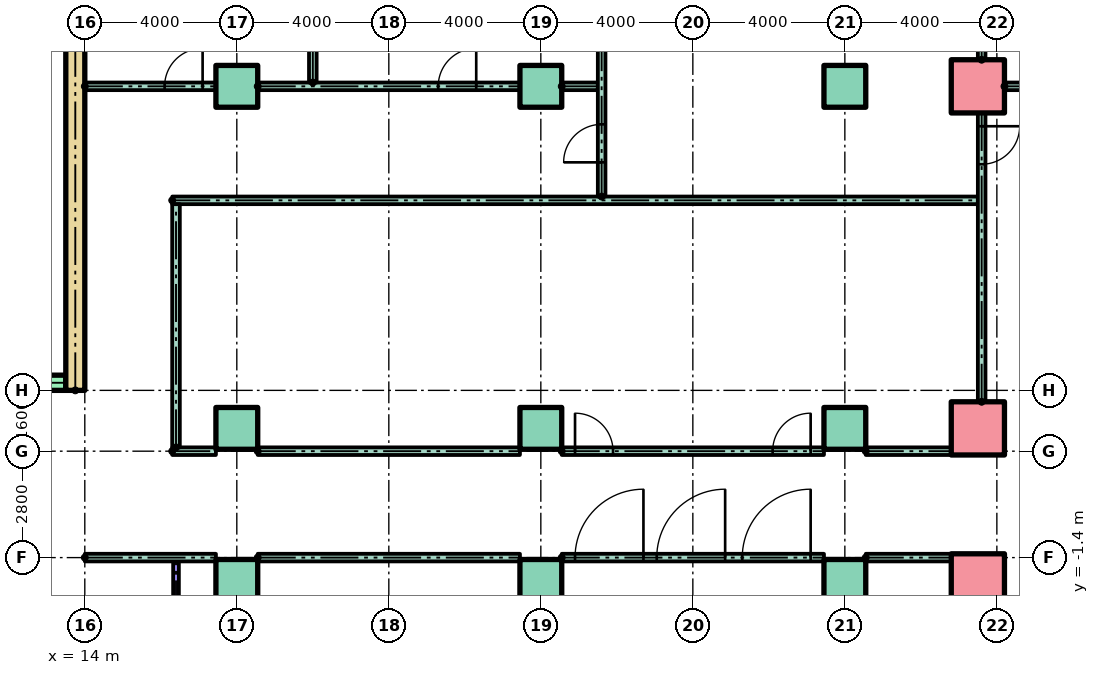
"""IFC4 building model, lengths in metres.
Left out: names, types, materials, properties, quantities, classifications, styles, units other than length and angle.
Written with IfcOpenShell. Run it as: python <this file> out.ifc"""

import sys

from ifc_helpers import new_model, si_unit, direction, frame, frame_2d, origin, origin_2d, place, context, subcontext, project, spatial, rectangle, hollow_rectangle, extrude, element, fill, save


model = new_model("IFC4")
c1 = context("Model", 3, precision=1e-05, world=origin(), true_north=direction((0.0, 1.0)))
c2 = subcontext(c1, "Body", "Model", "MODEL_VIEW")
j1 = project(units=[si_unit("LENGTHUNIT", "METRE"), si_unit("PLANEANGLEUNIT", "RADIAN")], contexts=[c1])
p1 = place(None, origin())
s1 = spatial("IfcSite", under=j1, at=p1, CompositionType="ELEMENT")
p2 = place(p1, origin())
s2 = spatial("IfcBuilding", under=s1, at=p2, CompositionType="ELEMENT")
p3 = place(p2, origin())
s3 = spatial("IfcBuildingStorey", under=s2, at=p3, CompositionType="ELEMENT", Elevation=0.0)
for number, where in (
    (1, (18.0, -2.0, 0.0)),
    (2, (26.0, -2.0, 0.0)),
    (3, (34.0, -2.0, 0.0)),
):
    element("IfcColumn", number, at=place(p3, frame(where)), inside=s3, PredefinedType="COLUMN", context=c2, shape_type="SweptSolid", body=[
        extrude(rectangle(XDim=1.1, YDim=1.1, at=origin_2d()), origin(), (0.0, 0.0, 1.0), 6.0),
    ])
p4 = place(p3, frame((37.5, -2.0, 0.0)))
e4 = element("IfcColumn", 4, at=p4, inside=s3, PredefinedType="COLUMN", context=c2, shape_type="SweptSolid", body=[
    extrude(hollow_rectangle(XDim=1.4, YDim=1.4, WallThickness=0.08, at=origin_2d()), origin(), (0.0, 0.0, 1.0), 6.0),
])
for number, where in (
    (5, (18.0, 2.0, 0.0)),
    (6, (26.0, 2.0, 0.0)),
    (7, (34.0, 2.0, 0.0)),
):
    element("IfcColumn", number, at=place(p3, frame(where)), inside=s3, PredefinedType="COLUMN", context=c2, shape_type="SweptSolid", body=[
        extrude(rectangle(XDim=1.1, YDim=1.1, at=origin_2d()), origin(), (0.0, 0.0, 1.0), 6.0),
    ])
p5 = place(p3, frame((37.5, 2.0, 0.0)))
e8 = element("IfcColumn", 8, at=p5, inside=s3, PredefinedType="COLUMN", context=c2, shape_type="SweptSolid", body=[
    extrude(hollow_rectangle(XDim=1.4, YDim=1.4, WallThickness=0.08, at=origin_2d()), origin(), (0.0, 0.0, 1.0), 6.0),
])
for number, where in (
    (9, (18.0, 11.0, 0.0)),
    (10, (26.0, 11.0, 0.0)),
    (11, (34.0, 11.0, 0.0)),
):
    element("IfcColumn", number, at=place(p3, frame(where)), inside=s3, PredefinedType="COLUMN", context=c2, shape_type="SweptSolid", body=[
        extrude(rectangle(XDim=1.1, YDim=1.1, at=origin_2d()), origin(), (0.0, 0.0, 1.0), 6.0),
    ])
p6 = place(p3, frame((37.5, 11.0, 0.0)))
e12 = element("IfcColumn", 12, at=p6, inside=s3, PredefinedType="COLUMN", context=c2, shape_type="SweptSolid", body=[
    extrude(hollow_rectangle(XDim=1.4, YDim=1.4, WallThickness=0.08, at=origin_2d()), origin(), (0.0, 0.0, 1.0), 6.0),
])
p7 = place(p3, frame((13.75, 3.0, 0.0), z_axis=(0.0, 0.0, 1.0), x_axis=(0.0, 1.0, 0.0)))
e13 = element("IfcWall", 13, at=p7, inside=s3, PredefinedType="SHEAR", context=c2, shape_type="SweptSolid", body=[
    extrude(rectangle(XDim=17.0, YDim=0.5, at=frame_2d((8.5, 0.0))), origin(), (0.0, 0.0, 1.0), 5.7),
])
p8 = place(p3, frame((-13.5, 3.2, 0.0)))
e14 = element("IfcWall", 14, at=p8, inside=s3, PredefinedType="SHEAR", context=c2, shape_type="SweptSolid", body=[
    extrude(rectangle(XDim=27.0, YDim=0.4, at=frame_2d((13.5, 0.0))), origin(), (0.0, 0.0, 1.0), 5.7),
])
p9 = place(p8, frame((0.772, 0.0, 0.0)))
e15 = element("IfcOpeningElement", 15, at=p9, cuts=e14, PredefinedType="OPENING", context=c2, shape_type="SweptSolid", body=[
    extrude(rectangle(XDim=1.1, YDim=2.1, at=frame_2d((0.55, 1.05))), frame((0.0, 0.21, 0.0), z_axis=(0.0, -1.0, 0.0), x_axis=(1.0, 0.0, 0.0)), (0.0, 0.0, 1.0), 0.42),
])
p10 = place(p8, frame((3.817, 0.0, 0.0)))
e16 = element("IfcOpeningElement", 16, at=p10, cuts=e14, PredefinedType="OPENING", context=c2, shape_type="SweptSolid", body=[
    extrude(rectangle(XDim=1.1, YDim=2.1, at=frame_2d((0.55, 1.05))), frame((0.0, 0.21, 0.0), z_axis=(0.0, -1.0, 0.0), x_axis=(1.0, 0.0, 0.0)), (0.0, 0.0, 1.0), 0.42),
])
p11 = place(p8, frame((6.861, 0.0, 0.0)))
e17 = element("IfcOpeningElement", 17, at=p11, cuts=e14, PredefinedType="OPENING", context=c2, shape_type="SweptSolid", body=[
    extrude(rectangle(XDim=1.1, YDim=2.1, at=frame_2d((0.55, 1.05))), frame((0.0, 0.21, 0.0), z_axis=(0.0, -1.0, 0.0), x_axis=(1.0, 0.0, 0.0)), (0.0, 0.0, 1.0), 0.42),
])
p12 = place(p8, frame((9.906, 0.0, 0.0)))
e18 = element("IfcOpeningElement", 18, at=p12, cuts=e14, PredefinedType="OPENING", context=c2, shape_type="SweptSolid", body=[
    extrude(rectangle(XDim=1.1, YDim=2.1, at=frame_2d((0.55, 1.05))), frame((0.0, 0.21, 0.0), z_axis=(0.0, -1.0, 0.0), x_axis=(1.0, 0.0, 0.0)), (0.0, 0.0, 1.0), 0.42),
])
p13 = place(p8, frame((15.994, 0.0, 0.0)))
e19 = element("IfcOpeningElement", 19, at=p13, cuts=e14, PredefinedType="OPENING", context=c2, shape_type="SweptSolid", body=[
    extrude(rectangle(XDim=1.1, YDim=2.1, at=frame_2d((0.55, 1.05))), frame((0.0, 0.21, 0.0), z_axis=(0.0, -1.0, 0.0), x_axis=(1.0, 0.0, 0.0)), (0.0, 0.0, 1.0), 0.42),
])
p14 = place(p8, frame((19.039, 0.0, 0.0)))
e20 = element("IfcOpeningElement", 20, at=p14, cuts=e14, PredefinedType="OPENING", context=c2, shape_type="SweptSolid", body=[
    extrude(rectangle(XDim=1.1, YDim=2.1, at=frame_2d((0.55, 1.05))), frame((0.0, 0.21, 0.0), z_axis=(0.0, -1.0, 0.0), x_axis=(1.0, 0.0, 0.0)), (0.0, 0.0, 1.0), 0.42),
])
p15 = place(p8, frame((12.6, 0.0, 0.0)))
e21 = element("IfcOpeningElement", 21, at=p15, cuts=e14, PredefinedType="OPENING", context=c2, shape_type="SweptSolid", body=[
    extrude(rectangle(XDim=1.8, YDim=2.1, at=frame_2d((0.9, 1.05))), frame((0.0, 0.21, 0.0), z_axis=(0.0, -1.0, 0.0), x_axis=(1.0, 0.0, 0.0)), (0.0, 0.0, 1.0), 0.42),
])
p16 = place(p3, frame((14.0, -1.4, 0.0)))
e22 = element("IfcWall", 22, at=p16, inside=s3, PredefinedType="PARTITIONING", context=c2, shape_type="SweptSolid", body=[
    extrude(rectangle(XDim=3.45, YDim=0.2, at=frame_2d((1.725, 0.0))), origin(), (0.0, 0.0, 1.0), 5.7),
])
p17 = place(p3, frame((18.55, -1.4, 0.0)))
e23 = element("IfcWall", 23, at=p17, inside=s3, PredefinedType="PARTITIONING", context=c2, shape_type="SweptSolid", body=[
    extrude(rectangle(XDim=6.9, YDim=0.2, at=frame_2d((3.45, 0.0))), origin(), (0.0, 0.0, 1.0), 5.7),
])
p18 = place(p3, frame((26.55, -1.4, 0.0)))
e24 = element("IfcWall", 24, at=p18, inside=s3, PredefinedType="PARTITIONING", context=c2, shape_type="SweptSolid", body=[
    extrude(rectangle(XDim=6.9, YDim=0.2, at=frame_2d((3.45, 0.0))), origin(), (0.0, 0.0, 1.0), 5.7),
])
p19 = place(p18, frame((0.35, 0.0, 0.0)))
e25 = element("IfcOpeningElement", 25, at=p19, cuts=e24, PredefinedType="OPENING", context=c2, shape_type="SweptSolid", body=[
    extrude(rectangle(XDim=1.8, YDim=2.1, at=frame_2d((0.9, 1.05))), frame((0.0, 0.11, 0.0), z_axis=(0.0, -1.0, 0.0), x_axis=(1.0, 0.0, 0.0)), (0.0, 0.0, 1.0), 0.22),
])
p20 = place(p18, frame((2.5, 0.0, 0.0)))
e26 = element("IfcOpeningElement", 26, at=p20, cuts=e24, PredefinedType="OPENING", context=c2, shape_type="SweptSolid", body=[
    extrude(rectangle(XDim=1.8, YDim=2.1, at=frame_2d((0.9, 1.05))), frame((0.0, 0.11, 0.0), z_axis=(0.0, -1.0, 0.0), x_axis=(1.0, 0.0, 0.0)), (0.0, 0.0, 1.0), 0.22),
])
p21 = place(p18, frame((4.75, 0.0, 0.0)))
e27 = element("IfcOpeningElement", 27, at=p21, cuts=e24, PredefinedType="OPENING", context=c2, shape_type="SweptSolid", body=[
    extrude(rectangle(XDim=1.8, YDim=2.1, at=frame_2d((0.9, 1.05))), frame((0.0, 0.11, 0.0), z_axis=(0.0, -1.0, 0.0), x_axis=(1.0, 0.0, 0.0)), (0.0, 0.0, 1.0), 0.22),
])
p22 = place(p3, frame((34.55, -1.4, 0.0)))
e28 = element("IfcWall", 28, at=p22, inside=s3, PredefinedType="PARTITIONING", context=c2, shape_type="SweptSolid", body=[
    extrude(rectangle(XDim=2.25, YDim=0.2, at=frame_2d((1.125, 0.0))), origin(), (0.0, 0.0, 1.0), 5.7),
])
p23 = place(p3, frame((16.3, 1.4, 0.0)))
e29 = element("IfcWall", 29, at=p23, inside=s3, PredefinedType="PARTITIONING", context=c2, shape_type="SweptSolid", body=[
    extrude(rectangle(XDim=1.15, YDim=0.2, at=frame_2d((0.575, 0.0))), origin(), (0.0, 0.0, 1.0), 5.7),
])
p24 = place(p3, frame((18.55, 1.4, 0.0)))
e30 = element("IfcWall", 30, at=p24, inside=s3, PredefinedType="PARTITIONING", context=c2, shape_type="SweptSolid", body=[
    extrude(rectangle(XDim=6.9, YDim=0.2, at=frame_2d((3.45, 0.0))), origin(), (0.0, 0.0, 1.0), 5.7),
])
p25 = place(p3, frame((26.55, 1.4, 0.0)))
e31 = element("IfcWall", 31, at=p25, inside=s3, PredefinedType="PARTITIONING", context=c2, shape_type="SweptSolid", body=[
    extrude(rectangle(XDim=6.9, YDim=0.2, at=frame_2d((3.45, 0.0))), origin(), (0.0, 0.0, 1.0), 5.7),
])
p26 = place(p25, frame((0.35, 0.0, 0.0)))
e32 = element("IfcOpeningElement", 32, at=p26, cuts=e31, PredefinedType="OPENING", context=c2, shape_type="SweptSolid", body=[
    extrude(rectangle(XDim=1.0, YDim=2.1, at=frame_2d((0.5, 1.05))), frame((0.0, 0.11, 0.0), z_axis=(0.0, -1.0, 0.0), x_axis=(1.0, 0.0, 0.0)), (0.0, 0.0, 1.0), 0.22),
])
p27 = place(p25, frame((5.55, 0.0, 0.0)))
e33 = element("IfcOpeningElement", 33, at=p27, cuts=e31, PredefinedType="OPENING", context=c2, shape_type="SweptSolid", body=[
    extrude(rectangle(XDim=1.0, YDim=2.1, at=frame_2d((0.5, 1.05))), frame((0.0, 0.11, 0.0), z_axis=(0.0, -1.0, 0.0), x_axis=(1.0, 0.0, 0.0)), (0.0, 0.0, 1.0), 0.22),
])
p28 = place(p3, frame((34.55, 1.4, 0.0)))
e34 = element("IfcWall", 34, at=p28, inside=s3, PredefinedType="PARTITIONING", context=c2, shape_type="SweptSolid", body=[
    extrude(rectangle(XDim=2.25, YDim=0.2, at=frame_2d((1.125, 0.0))), origin(), (0.0, 0.0, 1.0), 5.7),
])
p29 = place(p3, frame((16.3, 8.0, 0.0)))
e35 = element("IfcWall", 35, at=p29, inside=s3, PredefinedType="PARTITIONING", context=c2, shape_type="SweptSolid", body=[
    extrude(rectangle(XDim=21.2, YDim=0.2, at=frame_2d((10.6, 0.0))), origin(), (0.0, 0.0, 1.0), 5.7),
])
p30 = place(p3, frame((14.0, 11.0, 0.0)))
e36 = element("IfcWall", 36, at=p30, inside=s3, PredefinedType="PARTITIONING", context=c2, shape_type="SweptSolid", body=[
    extrude(rectangle(XDim=3.45, YDim=0.2, at=frame_2d((1.725, 0.0))), origin(), (0.0, 0.0, 1.0), 5.7),
])
p31 = place(p30, frame((2.1, 0.0, 0.0)))
e37 = element("IfcOpeningElement", 37, at=p31, cuts=e36, PredefinedType="OPENING", context=c2, shape_type="SweptSolid", body=[
    extrude(rectangle(XDim=1.0, YDim=2.1, at=frame_2d((0.5, 1.05))), frame((0.0, 0.11, 0.0), z_axis=(0.0, -1.0, 0.0), x_axis=(1.0, 0.0, 0.0)), (0.0, 0.0, 1.0), 0.22),
])
p32 = place(p3, frame((18.55, 11.0, 0.0)))
e38 = element("IfcWall", 38, at=p32, inside=s3, PredefinedType="PARTITIONING", context=c2, shape_type="SweptSolid", body=[
    extrude(rectangle(XDim=6.9, YDim=0.2, at=frame_2d((3.45, 0.0))), origin(), (0.0, 0.0, 1.0), 5.7),
])
p33 = place(p32, frame((4.75, 0.0, 0.0)))
e39 = element("IfcOpeningElement", 39, at=p33, cuts=e38, PredefinedType="OPENING", context=c2, shape_type="SweptSolid", body=[
    extrude(rectangle(XDim=1.0, YDim=2.1, at=frame_2d((0.5, 1.05))), frame((0.0, 0.11, 0.0), z_axis=(0.0, -1.0, 0.0), x_axis=(1.0, 0.0, 0.0)), (0.0, 0.0, 1.0), 0.22),
])
p34 = place(p3, frame((26.55, 11.0, 0.0)))
e40 = element("IfcWall", 40, at=p34, inside=s3, PredefinedType="PARTITIONING", context=c2, shape_type="SweptSolid", body=[
    extrude(rectangle(XDim=0.95, YDim=0.2, at=frame_2d((0.475, 0.0))), origin(), (0.0, 0.0, 1.0), 5.7),
])
p35 = place(p3, frame((38.2, 11.0, 0.0)))
e41 = element("IfcWall", 41, at=p35, inside=s3, PredefinedType="PARTITIONING", context=c2, shape_type="SweptSolid", body=[
    extrude(rectangle(XDim=1.4, YDim=0.2, at=frame_2d((0.7, 0.0))), origin(), (0.0, 0.0, 1.0), 5.7),
])
p36 = place(p3, frame((16.4, 1.5, 0.0), z_axis=(0.0, 0.0, 1.0), x_axis=(0.0, 1.0, 0.0)))
e42 = element("IfcWall", 42, at=p36, inside=s3, PredefinedType="PARTITIONING", context=c2, shape_type="SweptSolid", body=[
    extrude(rectangle(XDim=6.4, YDim=0.2, at=frame_2d((3.2, 0.0))), origin(), (0.0, 0.0, 1.0), 5.7),
])
p37 = place(p3, frame((16.4, -19.5, 0.0), z_axis=(0.0, 0.0, 1.0), x_axis=(0.0, 1.0, 0.0)))
e43 = element("IfcWall", 43, at=p37, inside=s3, PredefinedType="PARTITIONING", context=c2, shape_type="SweptSolid", body=[
    extrude(rectangle(XDim=18.0, YDim=0.15, at=frame_2d((9.0, 0.0))), origin(), (0.0, 0.0, 1.0), 5.7),
])
p38 = place(p3, frame((20.0, 11.1, 0.0), z_axis=(0.0, 0.0, 1.0), x_axis=(0.0, 1.0, 0.0)))
e44 = element("IfcWall", 44, at=p38, inside=s3, PredefinedType="PARTITIONING", context=c2, shape_type="SweptSolid", body=[
    extrude(rectangle(XDim=8.5, YDim=0.2, at=frame_2d((4.25, 0.0))), origin(), (0.0, 0.0, 1.0), 5.7),
])
p39 = place(p3, frame((27.6, 8.1, 0.0), z_axis=(0.0, 0.0, 1.0), x_axis=(0.0, 1.0, 0.0)))
e45 = element("IfcWall", 45, at=p39, inside=s3, PredefinedType="PARTITIONING", context=c2, shape_type="SweptSolid", body=[
    extrude(rectangle(XDim=11.5, YDim=0.2, at=frame_2d((5.75, 0.0))), origin(), (0.0, 0.0, 1.0), 5.7),
])
p40 = place(p39, frame((0.9, 0.0, 0.0)))
e46 = element("IfcOpeningElement", 46, at=p40, cuts=e45, PredefinedType="OPENING", context=c2, shape_type="SweptSolid", body=[
    extrude(rectangle(XDim=1.0, YDim=2.1, at=frame_2d((0.5, 1.05))), frame((0.0, 0.11, 0.0), z_axis=(0.0, -1.0, 0.0), x_axis=(1.0, 0.0, 0.0)), (0.0, 0.0, 1.0), 0.22),
])
p41 = place(p3, frame((37.6, 2.7, 0.0), z_axis=(0.0, 0.0, 1.0), x_axis=(0.0, 1.0, 0.0)))
e47 = element("IfcWall", 47, at=p41, inside=s3, PredefinedType="PARTITIONING", context=c2, shape_type="SweptSolid", body=[
    extrude(rectangle(XDim=7.6, YDim=0.2, at=frame_2d((3.8, 0.0))), origin(), (0.0, 0.0, 1.0), 5.7),
])
p42 = place(p41, frame((6.25, 0.0, 0.0)))
e48 = element("IfcOpeningElement", 48, at=p42, cuts=e47, PredefinedType="OPENING", context=c2, shape_type="SweptSolid", body=[
    extrude(rectangle(XDim=1.0, YDim=2.1, at=frame_2d((0.5, 1.05))), frame((0.0, 0.11, 0.0), z_axis=(0.0, -1.0, 0.0), x_axis=(1.0, 0.0, 0.0)), (0.0, 0.0, 1.0), 0.22),
])
p43 = place(p3, frame((37.6, 11.7, 0.0), z_axis=(0.0, 0.0, 1.0), x_axis=(0.0, 1.0, 0.0)))
e49 = element("IfcWall", 49, at=p43, inside=s3, PredefinedType="PARTITIONING", context=c2, shape_type="SweptSolid", body=[
    extrude(rectangle(XDim=2.6, YDim=0.2, at=frame_2d((1.3, 0.0))), origin(), (0.0, 0.0, 1.0), 5.7),
])
p44 = place(p19, origin())
e50 = element("IfcDoor", 50, at=p44, inside=s3, OperationType="DOUBLE_DOOR_SINGLE_SWING", PredefinedType="DOOR", context=c2, shape_type="SweptSolid", body=[
    extrude(rectangle(XDim=1.8, YDim=2.1, at=frame_2d((0.9, 1.05))), frame((0.0, 0.025, 0.0), z_axis=(0.0, -1.0, 0.0), x_axis=(1.0, 0.0, 0.0)), (0.0, 0.0, 1.0), 0.05),
])
fill(e25, e50)
p45 = place(p20, origin())
e51 = element("IfcDoor", 51, at=p45, inside=s3, OperationType="DOUBLE_DOOR_SINGLE_SWING", PredefinedType="DOOR", context=c2, shape_type="SweptSolid", body=[
    extrude(rectangle(XDim=1.8, YDim=2.1, at=frame_2d((0.9, 1.05))), frame((0.0, 0.025, 0.0), z_axis=(0.0, -1.0, 0.0), x_axis=(1.0, 0.0, 0.0)), (0.0, 0.0, 1.0), 0.05),
])
fill(e26, e51)
p46 = place(p21, origin())
e52 = element("IfcDoor", 52, at=p46, inside=s3, OperationType="DOUBLE_DOOR_SINGLE_SWING", PredefinedType="DOOR", context=c2, shape_type="SweptSolid", body=[
    extrude(rectangle(XDim=1.8, YDim=2.1, at=frame_2d((0.9, 1.05))), frame((0.0, 0.025, 0.0), z_axis=(0.0, -1.0, 0.0), x_axis=(1.0, 0.0, 0.0)), (0.0, 0.0, 1.0), 0.05),
])
fill(e27, e52)
p47 = place(p26, origin())
e53 = element("IfcDoor", 53, at=p47, inside=s3, OperationType="SINGLE_SWING_LEFT", PredefinedType="DOOR", context=c2, shape_type="SweptSolid", body=[
    extrude(rectangle(XDim=1.0, YDim=2.1, at=frame_2d((0.5, 1.05))), frame((0.0, 0.025, 0.0), z_axis=(0.0, -1.0, 0.0), x_axis=(1.0, 0.0, 0.0)), (0.0, 0.0, 1.0), 0.05),
])
fill(e32, e53)
p48 = place(p27, origin())
e54 = element("IfcDoor", 54, at=p48, inside=s3, OperationType="SINGLE_SWING_RIGHT", PredefinedType="DOOR", context=c2, shape_type="SweptSolid", body=[
    extrude(rectangle(XDim=1.0, YDim=2.1, at=frame_2d((0.5, 1.05))), frame((0.0, 0.025, 0.0), z_axis=(0.0, -1.0, 0.0), x_axis=(1.0, 0.0, 0.0)), (0.0, 0.0, 1.0), 0.05),
])
fill(e33, e54)
p49 = place(p42, frame((1.0, 0.0, 0.0), z_axis=(0.0, 0.0, 1.0), x_axis=(-1.0, 0.0, 0.0)))
e55 = element("IfcDoor", 55, at=p49, inside=s3, OperationType="SINGLE_SWING_RIGHT", PredefinedType="DOOR", context=c2, shape_type="SweptSolid", body=[
    extrude(rectangle(XDim=1.0, YDim=2.1, at=frame_2d((0.5, 1.05))), frame((0.0, 0.025, 0.0), z_axis=(0.0, -1.0, 0.0), x_axis=(1.0, 0.0, 0.0)), (0.0, 0.0, 1.0), 0.05),
])
fill(e48, e55)
p50 = place(p40, origin())
e56 = element("IfcDoor", 56, at=p50, inside=s3, OperationType="SINGLE_SWING_LEFT", PredefinedType="DOOR", context=c2, shape_type="SweptSolid", body=[
    extrude(rectangle(XDim=1.0, YDim=2.1, at=frame_2d((0.5, 1.05))), frame((0.0, 0.025, 0.0), z_axis=(0.0, -1.0, 0.0), x_axis=(1.0, 0.0, 0.0)), (0.0, 0.0, 1.0), 0.05),
])
fill(e46, e56)
p51 = place(p31, origin())
e57 = element("IfcDoor", 57, at=p51, inside=s3, OperationType="SINGLE_SWING_RIGHT", PredefinedType="DOOR", context=c2, shape_type="SweptSolid", body=[
    extrude(rectangle(XDim=1.0, YDim=2.1, at=frame_2d((0.5, 1.05))), frame((0.0, 0.025, 0.0), z_axis=(0.0, -1.0, 0.0), x_axis=(1.0, 0.0, 0.0)), (0.0, 0.0, 1.0), 0.05),
])
fill(e37, e57)
p52 = place(p33, origin())
e58 = element("IfcDoor", 58, at=p52, inside=s3, OperationType="SINGLE_SWING_RIGHT", PredefinedType="DOOR", context=c2, shape_type="SweptSolid", body=[
    extrude(rectangle(XDim=1.0, YDim=2.1, at=frame_2d((0.5, 1.05))), frame((0.0, 0.025, 0.0), z_axis=(0.0, -1.0, 0.0), x_axis=(1.0, 0.0, 0.0)), (0.0, 0.0, 1.0), 0.05),
])
fill(e39, e58)
save(model, sys.argv[1])
